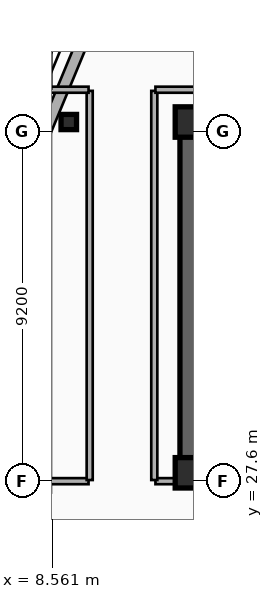
"""IFC4 building model, lengths in metres.
Left out: names, types, materials, properties, quantities, classifications, styles, units other than length and angle.
Written with IfcOpenShell. Run it as: python <this file> out.ifc"""

import sys

from ifc_helpers import new_model, si_unit, direction, frame, frame_2d, origin, origin_2d, place, context, subcontext, project, spatial, rectangle, i_section, extrude, element, save


model = new_model("IFC4")
c1 = context("Model", 3, precision=1e-05, world=origin(), true_north=direction((0.0, 1.0)))
c2 = subcontext(c1, "Body", "Model", "MODEL_VIEW")
j1 = project(units=[si_unit("LENGTHUNIT", "METRE"), si_unit("PLANEANGLEUNIT", "RADIAN")], contexts=[c1])
p1 = place(None, origin())
s1 = spatial("IfcSite", under=j1, at=p1, CompositionType="ELEMENT")
p2 = place(p1, origin())
s2 = spatial("IfcBuilding", under=s1, at=p2, CompositionType="ELEMENT")
p3 = place(p2, frame((0.0, 0.0, 243.6)))
s3 = spatial("IfcBuildingStorey", under=s2, at=p3, CompositionType="ELEMENT", Elevation=243.6)
p4 = place(p3, frame((12.15, 37.05, 0.0), z_axis=(0.0, 0.0, 1.0), x_axis=(1.0, 0.0, 0.0)))
e1 = element("IfcWall", 1, at=p4, inside=s3, PredefinedType="SHEAR", context=c2, shape_type="SweptSolid", body=[
    extrude(rectangle(XDim=33.23, YDim=0.45, at=frame_2d((16.615, 0.0))), origin(), (0.0, 0.0, 1.0), 3.7),
])
p5 = place(p3, frame((21.18, 27.82, 0.0), z_axis=(0.0, 0.0, 1.0), x_axis=(-1.0, 0.0, 0.0)))
e2 = element("IfcWall", 2, at=p5, inside=s3, PredefinedType="SHEAR", context=c2, shape_type="SweptSolid", body=[
    extrude(rectangle(XDim=9.03, YDim=0.45, at=frame_2d((4.515, 0.0))), origin(), (0.0, 0.0, 1.0), 3.7),
])
p6 = place(p5, frame((2.68, 0.0, 0.0)))
e3 = element("IfcOpeningElement", 3, at=p6, cuts=e2, PredefinedType="OPENING", context=c2, shape_type="SweptSolid", body=[
    extrude(rectangle(XDim=1.1, YDim=2.15, at=frame_2d((0.55, 1.075))), frame((0.0, 0.235, 0.0), z_axis=(0.0, -1.0, 0.0), x_axis=(1.0, 0.0, 0.0)), (0.0, 0.0, 1.0), 0.47),
])
p7 = place(p3, frame((12.15, 28.045, 0.0), z_axis=(0.0, 0.0, 1.0), x_axis=(0.0, 1.0, 0.0)))
e4 = element("IfcWall", 4, at=p7, inside=s3, PredefinedType="SHEAR", context=c2, shape_type="SweptSolid", body=[
    extrude(rectangle(XDim=8.78, YDim=0.45, at=frame_2d((4.39, 0.0))), origin(), (0.0, 0.0, 1.0), 3.7),
])
for number, where, z_axis, x_axis in (
    (5, (12.2, 27.82, 0.0), (0.0, 0.0, 1.0), (1.0, 0.0, 0.0)),
    (6, (12.2, 37.05, 0.0), (0.0, 0.0, 1.0), (1.0, 0.0, 0.0)),
):
    element("IfcColumn", number, at=place(p3, frame(where, z_axis=z_axis, x_axis=x_axis)), inside=s3, PredefinedType="COLUMN", context=c2, shape_type="SweptSolid", body=[
        extrude(rectangle(XDim=0.8, YDim=0.8, at=origin_2d()), origin(), (0.0, 0.0, 1.0), 3.7),
    ])
p8 = place(p3, frame((9.0, 37.05, 0.0), z_axis=(0.0, 0.0, 1.0), x_axis=(1.0, 0.0, 0.0)))
e7 = element("IfcColumn", 7, at=p8, inside=s3, PredefinedType="COLUMN", context=c2, shape_type="SweptSolid", body=[
    extrude(i_section(OverallWidth=0.408, OverallDepth=0.4, WebThickness=0.025, FlangeThickness=0.039, FilletRadius=0.015, at=origin_2d()), origin(), (0.0, 0.0, 1.0), 3.7),
])
p9 = place(p3, frame((8.38, 36.8, 0.0), z_axis=(0.0, 0.0, 1.0), x_axis=(0.382704529509, 0.923870793506, 0.0)))
e8 = element("IfcWall", 8, at=p9, inside=s3, PredefinedType="SOLIDWALL", context=c2, shape_type="SweptSolid", body=[
    extrude(rectangle(XDim=3.077, YDim=0.3, at=frame_2d((1.538, 0.0))), origin(), (0.0, 0.0, 1.0), 3.42),
])
p10 = place(p3, frame((8.49, 27.6, 0.0), z_axis=(0.0, 0.0, 1.0), x_axis=(1.0, 0.0, 0.0)))
e9 = element("IfcWall", 9, at=p10, inside=s3, PredefinedType="PARTITIONING", context=c2, shape_type="SweptSolid", body=[
    extrude(rectangle(XDim=1.03, YDim=0.16, at=frame_2d((0.515, 0.0))), origin(), (0.0, 0.0, 1.0), 3.42),
])
p11 = place(p3, frame((11.28, 27.6, 0.0), z_axis=(0.0, 0.0, 1.0), x_axis=(1.0, 0.0, 0.0)))
e10 = element("IfcWall", 10, at=p11, inside=s3, PredefinedType="PARTITIONING", context=c2, shape_type="SweptSolid", body=[
    extrude(rectangle(XDim=0.84, YDim=0.16, at=frame_2d((0.42, 0.0))), origin(), (0.0, 0.0, 1.0), 2.49),
])
for number, where, z_axis, x_axis in (
    (11, (9.55, 27.63, 0.0), (0.0, 0.0, 1.0), (0.0, 1.0, 0.0)),
    (12, (11.25, 27.63, 0.0), (0.0, 0.0, 1.0), (0.0, 1.0, 0.0)),
):
    element("IfcWall", number, at=place(p3, frame(where, z_axis=z_axis, x_axis=x_axis)), inside=s3, PredefinedType="PARTITIONING", context=c2, shape_type="SweptSolid", body=[
        extrude(rectangle(XDim=10.24, YDim=0.16, at=frame_2d((5.12, 0.0))), origin(), (0.0, 0.0, 1.0), 2.9),
    ])
p12 = place(p3, frame((8.49, 37.9, 0.0), z_axis=(0.0, 0.0, 1.0), x_axis=(1.0, 0.0, 0.0)))
e13 = element("IfcWall", 13, at=p12, inside=s3, PredefinedType="PARTITIONING", context=c2, shape_type="SweptSolid", body=[
    extrude(rectangle(XDim=1.03, YDim=0.16, at=frame_2d((0.515, 0.0))), origin(), (0.0, 0.0, 1.0), 3.42),
])
p13 = place(p3, frame((11.28, 37.9, 0.0), z_axis=(0.0, 0.0, 1.0), x_axis=(1.0, 0.0, 0.0)))
e14 = element("IfcWall", 14, at=p13, inside=s3, PredefinedType="PARTITIONING", context=c2, shape_type="SweptSolid", body=[
    extrude(rectangle(XDim=35.04, YDim=0.16, at=frame_2d((17.52, 0.0))), origin(), (0.0, 0.0, 1.0), 3.42),
])
save(model, sys.argv[1])
